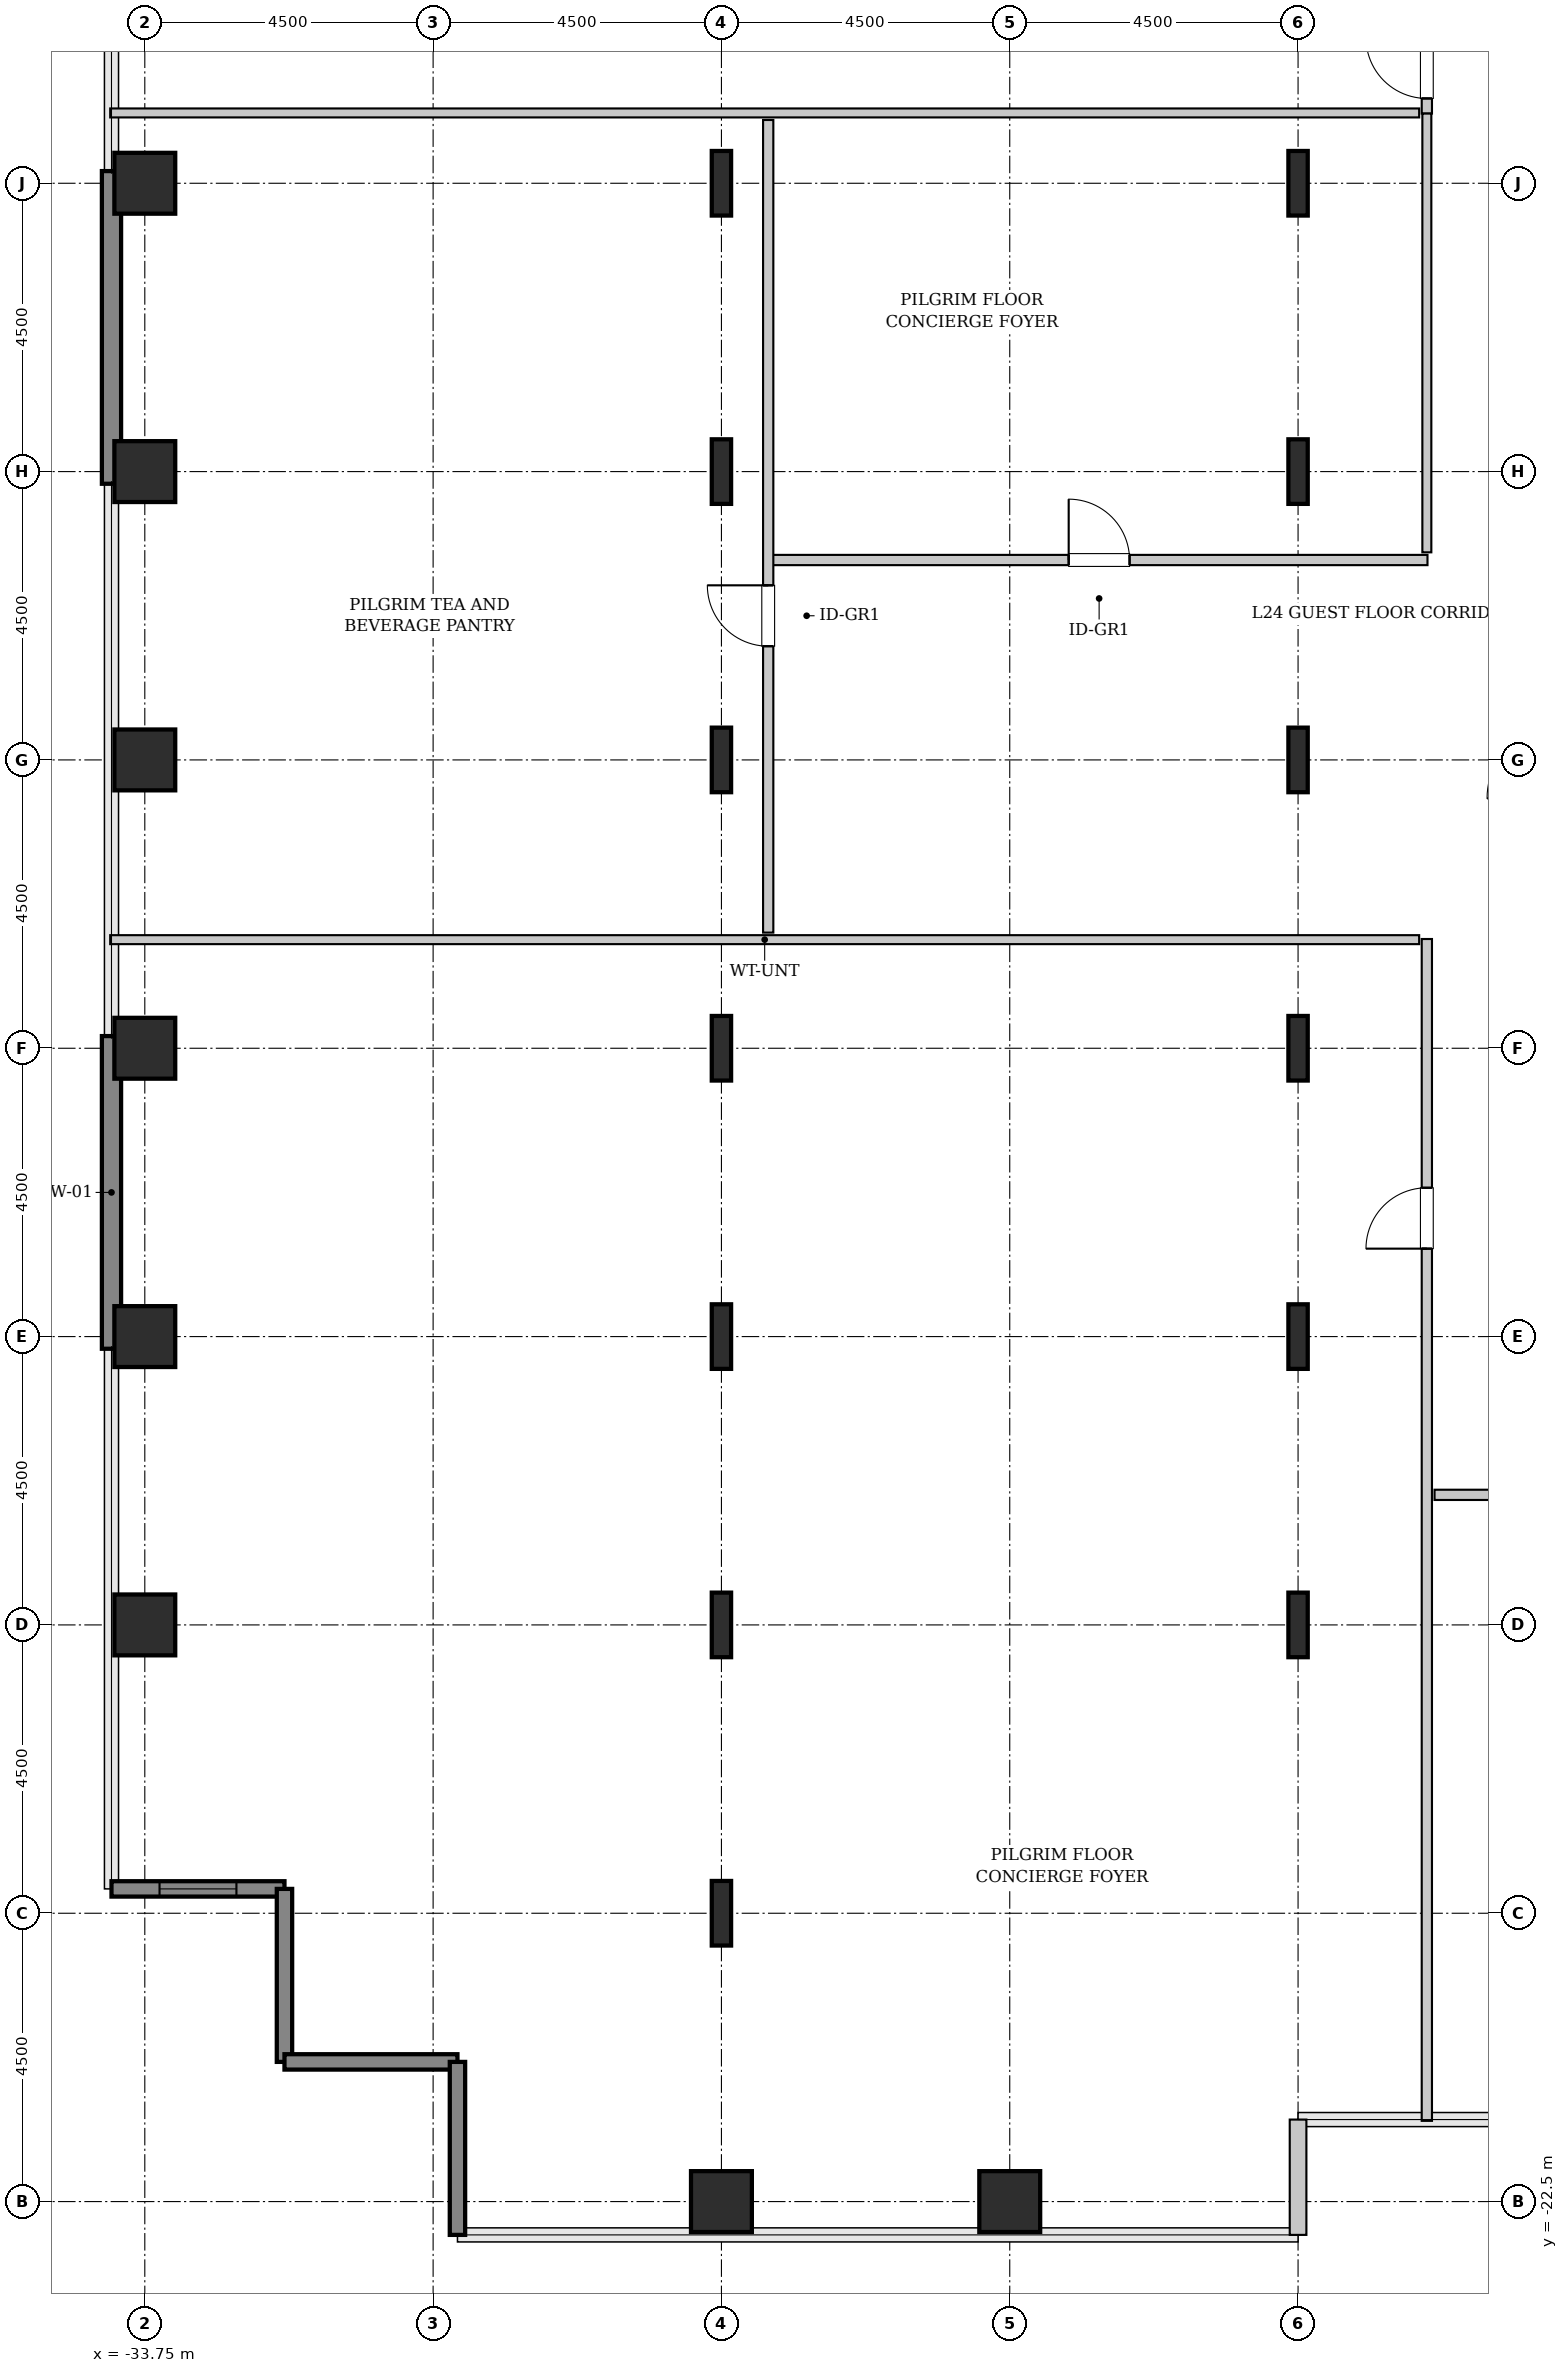
"""IFC4 building model, lengths in metres.
Left out: names, types, materials, properties, quantities, classifications, styles, units other than length and angle.
Written with IfcOpenShell. Run it as: python <this file> out.ifc"""

import sys

from ifc_helpers import new_model, si_unit, direction, frame, frame_2d, origin, origin_2d, place, context, subcontext, project, spatial, rectangle, hollow_rectangle, i_section, extrude, source, transform, mapped, element, fill, save


model = new_model("IFC4")
c1 = context("Model", 3, precision=1e-05, world=origin(), true_north=direction((0.0, 1.0)))
c2 = subcontext(c1, "Body", "Model", "MODEL_VIEW")
j1 = project(units=[si_unit("LENGTHUNIT", "METRE"), si_unit("PLANEANGLEUNIT", "RADIAN")], contexts=[c1])
p1 = place(None, origin())
s1 = spatial("IfcSite", under=j1, at=p1, CompositionType="ELEMENT")
p2 = place(p1, origin())
s2 = spatial("IfcBuilding", under=s1, at=p2, CompositionType="ELEMENT")
p3 = place(p2, frame((0.0, 0.0, 102.2)))
s3 = spatial("IfcBuildingStorey", under=s2, at=p3, CompositionType="ELEMENT", Elevation=102.2)
m1 = source(origin(), c2, "Body", "SweptSolid", [
    extrude(hollow_rectangle(XDim=0.95, YDim=0.95, WallThickness=0.045, InnerFilletRadius=0.045, OuterFilletRadius=0.09, at=origin_2d()), origin(), (0.0, 0.0, 1.0), 3.8),
])
for number, where, z_axis, x_axis in (
    (1, (-33.75, -13.5, 0.0), (0.0, 0.0, 1.0), (1.0, 0.0, 0.0)),
    (2, (-33.75, -9.0, 0.0), (0.0, 0.0, 1.0), (1.0, 0.0, 0.0)),
    (3, (-33.75, -4.5, 0.0), (0.0, 0.0, 1.0), (1.0, 0.0, 0.0)),
    (4, (-33.75, 0.0, 0.0), (0.0, 0.0, 1.0), (1.0, 0.0, 0.0)),
    (5, (-33.75, 4.5, 0.0), (0.0, 0.0, 1.0), (1.0, 0.0, 0.0)),
    (6, (-33.75, 9.0, 0.0), (0.0, 0.0, 1.0), (1.0, 0.0, 0.0)),
    (7, (-24.75, -22.5, 0.0), (0.0, 0.0, 1.0), (1.0, 0.0, 0.0)),
):
    element("IfcColumn", number, at=place(p3, frame(where, z_axis=z_axis, x_axis=x_axis)), inside=s3, PredefinedType="COLUMN", context=c2, shape_type="MappedRepresentation", body=[
        mapped(m1, transform((0.0, 0.0, 0.0), x_axis=(1.0, 0.0, 0.0), y_axis=(0.0, 1.0, 0.0), z_axis=(0.0, 0.0, 1.0), scale=1.0)),
    ])
m2 = source(origin(), c2, "Body", "SweptSolid", [
    extrude(i_section(OverallWidth=0.302, OverallDepth=1.008, WebThickness=0.021, FlangeThickness=0.04, FilletRadius=0.03, at=origin_2d()), origin(), (0.0, 0.0, 1.0), 3.8),
])
for number, where, z_axis, x_axis in (
    (8, (-24.75, -18.0, 0.0), (0.0, 0.0, 1.0), (1.0, 0.0, 0.0)),
    (9, (-24.75, -13.5, 0.0), (0.0, 0.0, 1.0), (1.0, 0.0, 0.0)),
    (10, (-24.75, -9.0, 0.0), (0.0, 0.0, 1.0), (1.0, 0.0, 0.0)),
    (11, (-24.75, -4.5, 0.0), (0.0, 0.0, 1.0), (1.0, 0.0, 0.0)),
    (12, (-24.75, 0.0, 0.0), (0.0, 0.0, 1.0), (1.0, 0.0, 0.0)),
    (13, (-24.75, 4.5, 0.0), (0.0, 0.0, 1.0), (1.0, 0.0, 0.0)),
    (14, (-24.75, 9.0, 0.0), (0.0, 0.0, 1.0), (1.0, 0.0, 0.0)),
):
    element("IfcColumn", number, at=place(p3, frame(where, z_axis=z_axis, x_axis=x_axis)), inside=s3, PredefinedType="COLUMN", context=c2, shape_type="MappedRepresentation", body=[
        mapped(m2, transform((0.0, 0.0, 0.0), x_axis=(1.0, 0.0, 0.0), y_axis=(0.0, 1.0, 0.0), z_axis=(0.0, 0.0, 1.0), scale=1.0)),
    ])
p4 = place(p3, frame((-20.25, -22.5, 0.0), z_axis=(0.0, 0.0, 1.0), x_axis=(1.0, 0.0, 0.0)))
e15 = element("IfcColumn", 15, at=p4, inside=s3, PredefinedType="COLUMN", context=c2, shape_type="MappedRepresentation", body=[
    mapped(m1, transform((0.0, 0.0, 0.0), x_axis=(1.0, 0.0, 0.0), y_axis=(0.0, 1.0, 0.0), z_axis=(0.0, 0.0, 1.0), scale=1.0)),
])
for number, where, z_axis, x_axis in (
    (16, (-15.75, -13.5, 0.0), (0.0, 0.0, 1.0), (1.0, 0.0, 0.0)),
    (17, (-15.75, -9.0, 0.0), (0.0, 0.0, 1.0), (1.0, 0.0, 0.0)),
    (18, (-15.75, -4.5, 0.0), (0.0, 0.0, 1.0), (1.0, 0.0, 0.0)),
    (19, (-15.75, 0.0, 0.0), (0.0, 0.0, 1.0), (1.0, 0.0, 0.0)),
    (20, (-15.75, 4.5, 0.0), (0.0, 0.0, 1.0), (1.0, 0.0, 0.0)),
    (21, (-15.75, 9.0, 0.0), (0.0, 0.0, 1.0), (1.0, 0.0, 0.0)),
):
    element("IfcColumn", number, at=place(p3, frame(where, z_axis=z_axis, x_axis=x_axis)), inside=s3, PredefinedType="COLUMN", context=c2, shape_type="MappedRepresentation", body=[
        mapped(m2, transform((0.0, 0.0, 0.0), x_axis=(1.0, 0.0, 0.0), y_axis=(0.0, 1.0, 0.0), z_axis=(0.0, 0.0, 1.0), scale=1.0)),
    ])
m3 = source(origin(), c2, "Body", "SweptSolid", [
    extrude(rectangle(XDim=4.88, YDim=0.3, at=frame_2d((2.44, 0.0))), origin(), (0.0, 0.0, 1.0), 3.55),
])
for number, where, z_axis, x_axis in (
    (22, (-34.27, -9.19, 0.0), (0.0, 0.0, 1.0), (0.0, 1.0, 0.0)),
    (23, (-34.27, 4.31, 0.0), (0.0, 0.0, 1.0), (0.0, 1.0, 0.0)),
):
    element("IfcWall", number, at=place(p3, frame(where, z_axis=z_axis, x_axis=x_axis)), inside=s3, PredefinedType="SHEAR", context=c2, shape_type="MappedRepresentation", body=[
        mapped(m3, transform((0.0, 0.0, 0.0), x_axis=(1.0, 0.0, 0.0), y_axis=(0.0, 1.0, 0.0), z_axis=(0.0, 0.0, 1.0), scale=1.0)),
    ])
m4 = source(origin(), c2, "Body", "SweptSolid", [
    extrude(rectangle(XDim=2.7, YDim=0.24, at=frame_2d((1.35, 0.0))), origin(), (0.0, 0.0, 1.0), 3.55),
])
p5 = place(p3, frame((-34.27, -17.62, 0.0), z_axis=(0.0, 0.0, 1.0), x_axis=(1.0, 0.0, 0.0)))
e24 = element("IfcWall", 24, at=p5, inside=s3, PredefinedType="SHEAR", context=c2, shape_type="MappedRepresentation", body=[
    mapped(m4, transform((0.0, 0.0, 0.0), x_axis=(1.0, 0.0, 0.0), y_axis=(0.0, 1.0, 0.0), z_axis=(0.0, 0.0, 1.0), scale=1.0)),
])
p6 = place(p5, frame((0.75, 0.0, 0.85)))
e25 = element("IfcOpeningElement", 25, at=p6, cuts=e24, PredefinedType="OPENING", context=c2, shape_type="SweptSolid", body=[
    extrude(rectangle(XDim=1.2, YDim=1.8, at=frame_2d((0.6, 0.9))), frame((0.0, 0.13, 0.0), z_axis=(0.0, -1.0, 0.0), x_axis=(1.0, 0.0, 0.0)), (0.0, 0.0, 1.0), 0.26),
])
for number, where, z_axis, x_axis in (
    (26, (-31.57, -17.62, 0.0), (0.0, 0.0, 1.0), (0.0, -1.0, 0.0)),
    (27, (-31.57, -20.32, 0.0), (0.0, 0.0, 1.0), (1.0, 0.0, 0.0)),
    (28, (-28.87, -20.32, 0.0), (0.0, 0.0, 1.0), (0.0, -1.0, 0.0)),
):
    element("IfcWall", number, at=place(p3, frame(where, z_axis=z_axis, x_axis=x_axis)), inside=s3, PredefinedType="SHEAR", context=c2, shape_type="MappedRepresentation", body=[
        mapped(m4, transform((0.0, 0.0, 0.0), x_axis=(1.0, 0.0, 0.0), y_axis=(0.0, 1.0, 0.0), z_axis=(0.0, 0.0, 1.0), scale=1.0)),
    ])
m5 = source(origin(), c2, "Body", "SweptSolid", [
    extrude(rectangle(XDim=1.8, YDim=0.26, at=frame_2d((0.9, 0.0))), origin(), (0.0, 0.0, 1.0), 3.55),
])
p7 = place(p3, frame((-15.75, -23.02, 0.0), z_axis=(0.0, 0.0, 1.0), x_axis=(0.0, 1.0, 0.0)))
e29 = element("IfcWall", 29, at=p7, inside=s3, PredefinedType="SOLIDWALL", context=c2, shape_type="MappedRepresentation", body=[
    mapped(m5, transform((0.0, 0.0, 0.0), x_axis=(1.0, 0.0, 0.0), y_axis=(0.0, 1.0, 0.0), z_axis=(0.0, 0.0, 1.0), scale=1.0)),
])
m6 = source(origin(), c2, "Body", "SweptSolid", [
    extrude(rectangle(XDim=18.445, YDim=0.16, at=frame_2d((9.223, 0.0))), origin(), (0.0, 0.0, 1.0), 3.535),
])
p8 = place(p3, frame((-13.74, -21.24, 0.0), z_axis=(0.0, 0.0, 1.0), x_axis=(0.0, 1.0, 0.0)))
e30 = element("IfcWall", 30, at=p8, inside=s3, PredefinedType="PARTITIONING", context=c2, shape_type="MappedRepresentation", body=[
    mapped(m6, transform((0.0, 0.0, 0.0), x_axis=(1.0, 0.0, 0.0), y_axis=(0.0, 1.0, 0.0), z_axis=(0.0, 0.0, 1.0), scale=1.0)),
])
p9 = place(p8, frame((13.613, 0.0, 0.0)))
e31 = element("IfcOpeningElement", 31, at=p9, cuts=e30, PredefinedType="OPENING", context=c2, shape_type="SweptSolid", body=[
    extrude(rectangle(XDim=0.95, YDim=2.1, at=frame_2d((0.475, 1.05))), frame((0.0, 0.09, 0.0), z_axis=(0.0, -1.0, 0.0), x_axis=(1.0, 0.0, 0.0)), (0.0, 0.0, 1.0), 0.18),
])
m7 = source(origin(), c2, "Body", "SweptSolid", [
    extrude(rectangle(XDim=20.43, YDim=0.14, at=frame_2d((10.215, 0.0))), origin(), (0.0, 0.0, 1.0), 3.535),
])
p10 = place(p3, frame((-34.29, -2.805, 0.0), z_axis=(0.0, 0.0, 1.0), x_axis=(1.0, 0.0, 0.0)))
e32 = element("IfcWall", 32, at=p10, inside=s3, PredefinedType="PARTITIONING", context=c2, shape_type="MappedRepresentation", body=[
    mapped(m7, transform((0.0, 0.0, 0.0), x_axis=(1.0, 0.0, 0.0), y_axis=(0.0, 1.0, 0.0), z_axis=(0.0, 0.0, 1.0), scale=1.0)),
])
m8 = source(origin(), c2, "Body", "SweptSolid", [
    extrude(rectangle(XDim=11.153, YDim=0.16, at=frame_2d((5.576, 0.0))), origin(), (0.0, 0.0, 1.0), 3.535),
])
p11 = place(p3, frame((-13.74, 10.087, 0.0), z_axis=(0.0, 0.0, 1.0), x_axis=(0.0, 1.0, 0.0)))
e33 = element("IfcWall", 33, at=p11, inside=s3, PredefinedType="PARTITIONING", context=c2, shape_type="MappedRepresentation", body=[
    mapped(m8, transform((0.0, 0.0, 0.0), x_axis=(1.0, 0.0, 0.0), y_axis=(0.0, 1.0, 0.0), z_axis=(0.0, 0.0, 1.0), scale=1.0)),
])
p12 = place(p11, frame((0.236, 0.0, 0.0)))
e34 = element("IfcOpeningElement", 34, at=p12, cuts=e33, PredefinedType="OPENING", context=c2, shape_type="SweptSolid", body=[
    extrude(rectangle(XDim=0.95, YDim=2.1, at=frame_2d((0.475, 1.05))), frame((0.0, 0.09, 0.0), z_axis=(0.0, -1.0, 0.0), x_axis=(1.0, 0.0, 0.0)), (0.0, 0.0, 1.0), 0.18),
])
p13 = place(p3, frame((-34.29, 10.097, 0.0), z_axis=(0.0, 0.0, 1.0), x_axis=(1.0, 0.0, 0.0)))
e35 = element("IfcWall", 35, at=p13, inside=s3, PredefinedType="PARTITIONING", context=c2, shape_type="MappedRepresentation", body=[
    mapped(m7, transform((0.0, 0.0, 0.0), x_axis=(1.0, 0.0, 0.0), y_axis=(0.0, 1.0, 0.0), z_axis=(0.0, 0.0, 1.0), scale=1.0)),
])
m9 = source(origin(), c2, "Body", "SweptSolid", [
    extrude(rectangle(XDim=10.25, YDim=0.16, at=frame_2d((5.125, 0.0))), origin(), (0.0, 0.0, 1.0), 3.535),
])
p14 = place(p3, frame((-23.98, 3.12, 0.0), z_axis=(0.0, 0.0, 1.0), x_axis=(1.0, 0.0, 0.0)))
e36 = element("IfcWall", 36, at=p14, inside=s3, PredefinedType="PARTITIONING", context=c2, shape_type="MappedRepresentation", body=[
    mapped(m9, transform((0.0, 0.0, 0.0), x_axis=(1.0, 0.0, 0.0), y_axis=(0.0, 1.0, 0.0), z_axis=(0.0, 0.0, 1.0), scale=1.0)),
])
p15 = place(p14, frame((4.65, 0.0, 0.0)))
e37 = element("IfcOpeningElement", 37, at=p15, cuts=e36, PredefinedType="OPENING", context=c2, shape_type="SweptSolid", body=[
    extrude(rectangle(XDim=0.95, YDim=2.1, at=frame_2d((0.475, 1.05))), frame((0.0, 0.09, 0.0), z_axis=(0.0, -1.0, 0.0), x_axis=(1.0, 0.0, 0.0)), (0.0, 0.0, 1.0), 0.18),
])
m10 = source(origin(), c2, "Body", "SweptSolid", [
    extrude(rectangle(XDim=6.847, YDim=0.14, at=frame_2d((3.424, 0.0))), origin(), (0.0, 0.0, 1.0), 3.535),
])
p16 = place(p3, frame((-13.74, 3.24, 0.0), z_axis=(0.0, 0.0, 1.0), x_axis=(0.0, 1.0, 0.0)))
e38 = element("IfcWall", 38, at=p16, inside=s3, PredefinedType="PARTITIONING", context=c2, shape_type="MappedRepresentation", body=[
    mapped(m10, transform((0.0, 0.0, 0.0), x_axis=(1.0, 0.0, 0.0), y_axis=(0.0, 1.0, 0.0), z_axis=(0.0, 0.0, 1.0), scale=1.0)),
])
m11 = source(origin(), c2, "Body", "SweptSolid", [
    extrude(rectangle(XDim=12.683, YDim=0.16, at=frame_2d((6.341, 0.0))), origin(), (0.0, 0.0, 1.0), 3.535),
])
p17 = place(p3, frame((-24.02, -2.695, 0.0), z_axis=(0.0, 0.0, 1.0), x_axis=(0.0, 1.0, 0.0)))
e39 = element("IfcWall", 39, at=p17, inside=s3, PredefinedType="PARTITIONING", context=c2, shape_type="MappedRepresentation", body=[
    mapped(m11, transform((0.0, 0.0, 0.0), x_axis=(1.0, 0.0, 0.0), y_axis=(0.0, 1.0, 0.0), z_axis=(0.0, 0.0, 1.0), scale=1.0)),
])
p18 = place(p17, frame((4.47, 0.0, 0.0)))
e40 = element("IfcOpeningElement", 40, at=p18, cuts=e39, PredefinedType="OPENING", context=c2, shape_type="SweptSolid", body=[
    extrude(rectangle(XDim=0.95, YDim=2.1, at=frame_2d((0.475, 1.05))), frame((0.0, 0.09, 0.0), z_axis=(0.0, -1.0, 0.0), x_axis=(1.0, 0.0, 0.0)), (0.0, 0.0, 1.0), 0.18),
])
m12 = source(origin(), c2, "Body", "SweptSolid", [
    extrude(rectangle(XDim=4.378, YDim=0.16, at=frame_2d((2.189, 0.0))), origin(), (0.0, 0.0, 1.0), 3.535),
])
p19 = place(p3, frame((-13.62, -11.47, 0.0), z_axis=(0.0, 0.0, 1.0), x_axis=(1.0, 0.0, 0.0)))
e41 = element("IfcWall", 41, at=p19, inside=s3, PredefinedType="PARTITIONING", context=c2, shape_type="MappedRepresentation", body=[
    mapped(m12, transform((0.0, 0.0, 0.0), x_axis=(1.0, 0.0, 0.0), y_axis=(0.0, 1.0, 0.0), z_axis=(0.0, 0.0, 1.0), scale=1.0)),
])
p20 = place(p19, frame((1.714, 0.0, 0.0)))
e42 = element("IfcOpeningElement", 42, at=p20, cuts=e41, PredefinedType="OPENING", context=c2, shape_type="SweptSolid", body=[
    extrude(rectangle(XDim=0.95, YDim=2.1, at=frame_2d((0.475, 1.05))), frame((0.0, 0.09, 0.0), z_axis=(0.0, -1.0, 0.0), x_axis=(1.0, 0.0, 0.0)), (0.0, 0.0, 1.0), 0.18),
])
m13 = source(origin(), c2, "Body", "SweptSolid", [
    extrude(rectangle(XDim=1.2, YDim=1.8, at=frame_2d((0.6, 0.9))), frame((0.0, 0.03, 0.0), z_axis=(0.0, -1.0, 0.0), x_axis=(1.0, 0.0, 0.0)), (0.0, 0.0, 1.0), 0.06),
])
p21 = place(p6, origin())
e43 = element("IfcWindow", 43, at=p21, inside=s3, PartitioningType="SINGLE_PANEL", PredefinedType="WINDOW", context=c2, shape_type="MappedRepresentation", body=[
    mapped(m13, transform((0.0, 0.0, 0.0), x_axis=(1.0, 0.0, 0.0), y_axis=(0.0, 1.0, 0.0), z_axis=(0.0, 0.0, 1.0), scale=1.0)),
])
fill(e25, e43)
m14 = source(origin(), c2, "Body", "SweptSolid", [
    extrude(rectangle(XDim=0.95, YDim=2.1, at=frame_2d((0.475, 1.05))), frame((0.0, 0.025, 0.0), z_axis=(0.0, -1.0, 0.0), x_axis=(1.0, 0.0, 0.0)), (0.0, 0.0, 1.0), 0.05),
])
p22 = place(p9, origin())
e44 = element("IfcDoor", 44, at=p22, inside=s3, OperationType="SINGLE_SWING_LEFT", PredefinedType="DOOR", context=c2, shape_type="MappedRepresentation", body=[
    mapped(m14, transform((0.0, 0.0, 0.0), x_axis=(1.0, 0.0, 0.0), y_axis=(0.0, 1.0, 0.0), z_axis=(0.0, 0.0, 1.0), scale=1.0)),
])
fill(e31, e44)
p23 = place(p12, origin())
e45 = element("IfcDoor", 45, at=p23, inside=s3, OperationType="SINGLE_SWING_RIGHT", PredefinedType="DOOR", context=c2, shape_type="MappedRepresentation", body=[
    mapped(m14, transform((0.0, 0.0, 0.0), x_axis=(1.0, 0.0, 0.0), y_axis=(0.0, 1.0, 0.0), z_axis=(0.0, 0.0, 1.0), scale=1.0)),
])
fill(e34, e45)
p24 = place(p15, origin())
e46 = element("IfcDoor", 46, at=p24, inside=s3, OperationType="SINGLE_SWING_LEFT", PredefinedType="DOOR", context=c2, shape_type="MappedRepresentation", body=[
    mapped(m14, transform((0.0, 0.0, 0.0), x_axis=(1.0, 0.0, 0.0), y_axis=(0.0, 1.0, 0.0), z_axis=(0.0, 0.0, 1.0), scale=1.0)),
])
fill(e37, e46)
p25 = place(p18, origin())
e47 = element("IfcDoor", 47, at=p25, inside=s3, OperationType="SINGLE_SWING_RIGHT", PredefinedType="DOOR", context=c2, shape_type="MappedRepresentation", body=[
    mapped(m14, transform((0.0, 0.0, 0.0), x_axis=(1.0, 0.0, 0.0), y_axis=(0.0, 1.0, 0.0), z_axis=(0.0, 0.0, 1.0), scale=1.0)),
])
fill(e40, e47)
save(model, sys.argv[1])
